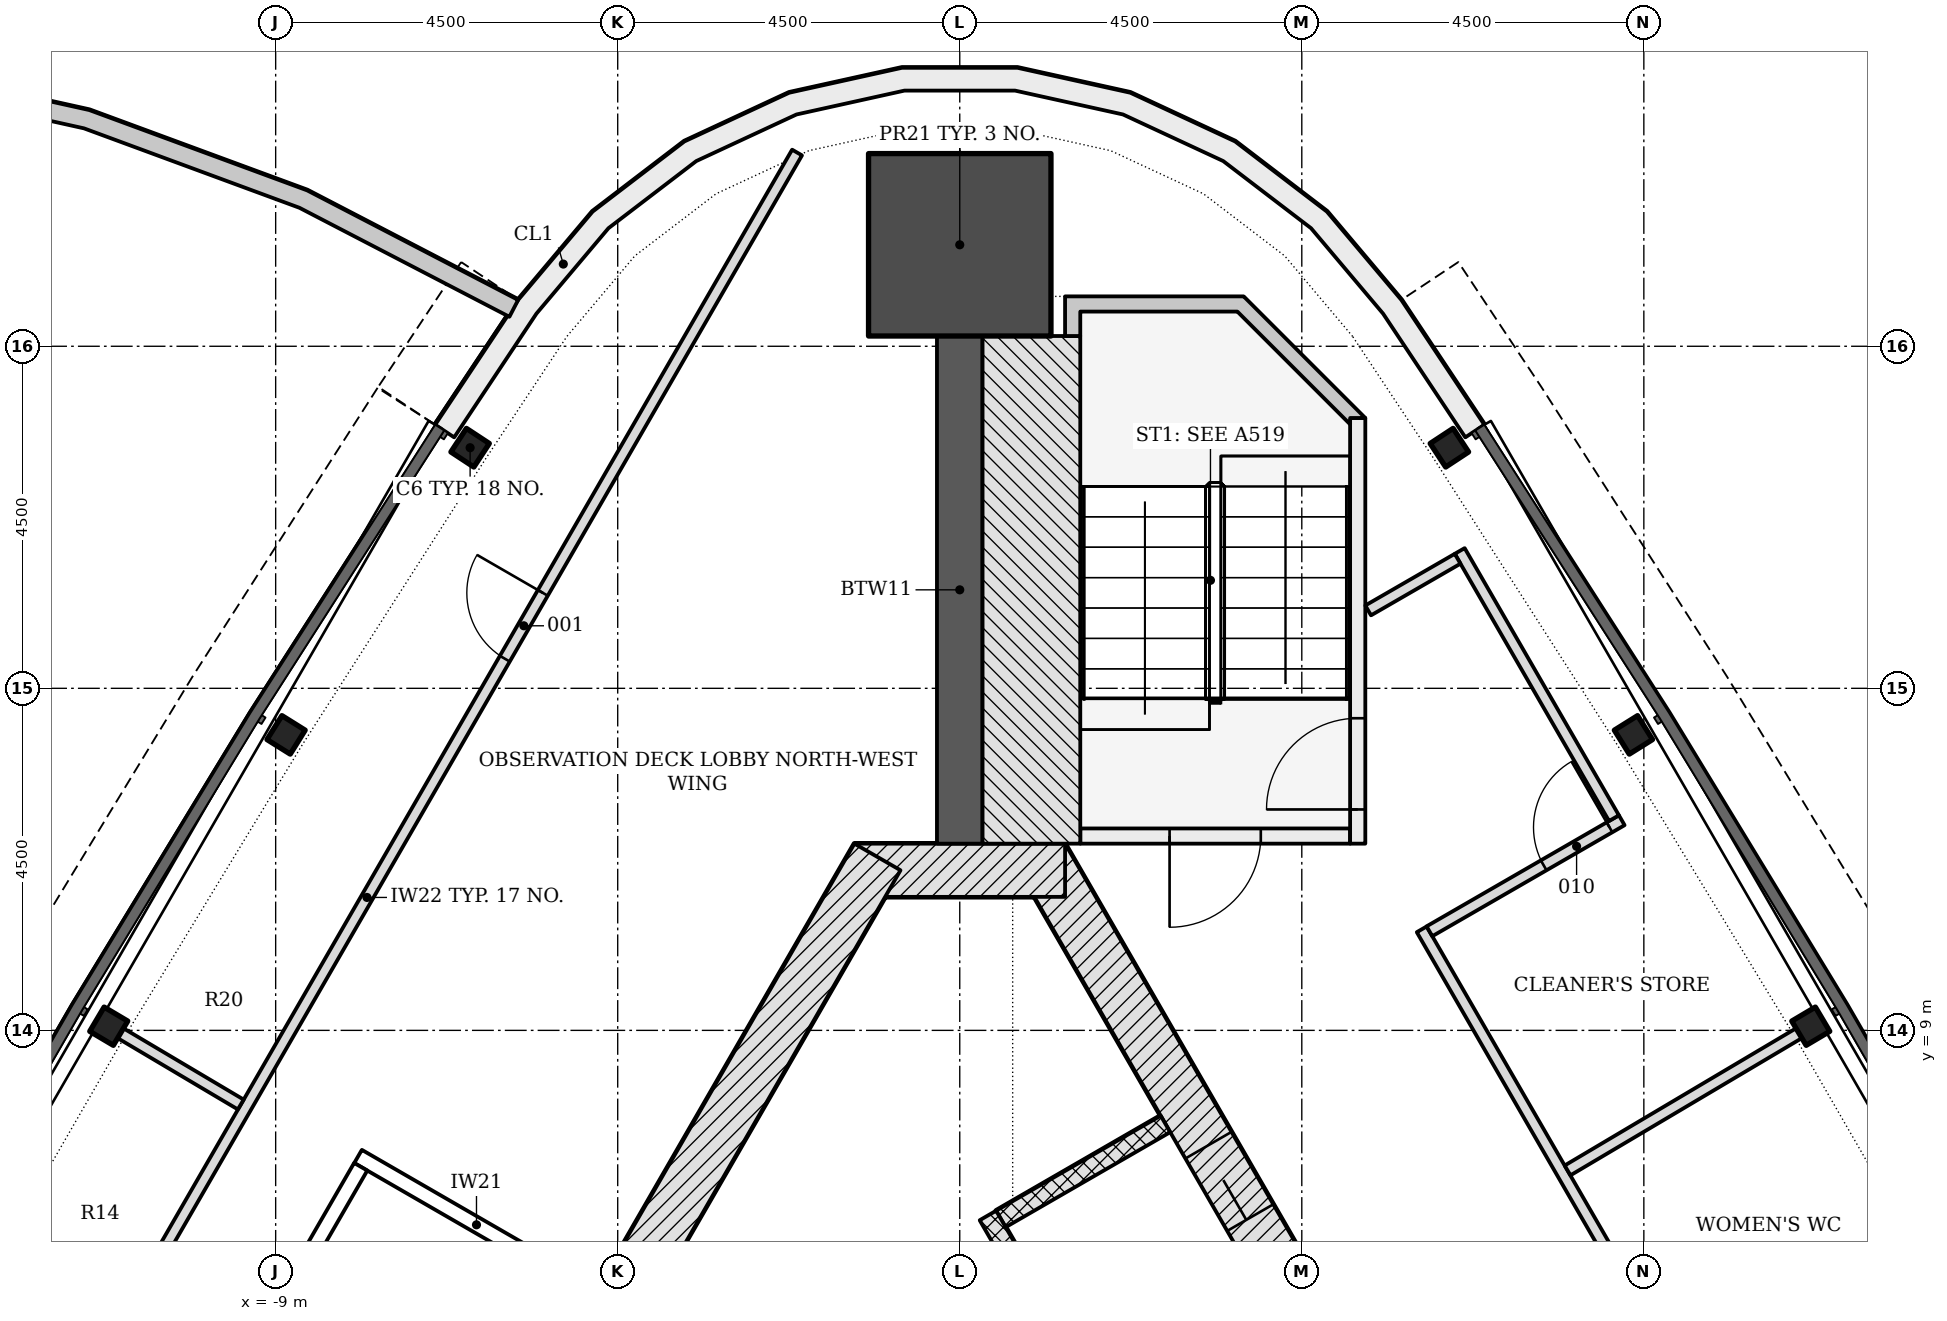
"""IFC4 building model, lengths in metres.
Left out: names, types, materials, properties, quantities, classifications, styles, units other than length and angle.
Written with IfcOpenShell. Run it as: python <this file> out.ifc"""

import sys

from ifc_helpers import new_model, si_unit, direction, frame, frame_2d, origin, origin_2d, place, context, subcontext, project, spatial, polyline, rectangle, i_section, outline, extrude, element, fill, save


model = new_model("IFC4")
c1 = context("Model", 3, precision=1e-05, world=origin(), true_north=direction((0.0, 1.0)))
c2 = subcontext(c1, "Body", "Model", "MODEL_VIEW")
j1 = project(units=[si_unit("LENGTHUNIT", "METRE"), si_unit("PLANEANGLEUNIT", "RADIAN")], contexts=[c1])
p1 = place(None, origin())
s1 = spatial("IfcSite", under=j1, at=p1, CompositionType="ELEMENT")
p2 = place(p1, origin())
s2 = spatial("IfcBuilding", under=s1, at=p2, CompositionType="ELEMENT")
p3 = place(p2, frame((0.0, 0.0, 274.2)))
s3 = spatial("IfcBuildingStorey", under=s2, at=p3, CompositionType="ELEMENT", Elevation=274.2)
p4 = place(p3, frame((10.311, -4.703, -0.2), z_axis=(0.0, 0.0, 1.0), x_axis=(-0.500001446645, 0.866024568562, 0.0)))
e1 = element("IfcWall", 1, at=p4, inside=s3, PredefinedType="SHEAR", context=c2, shape_type="SweptSolid", body=[
    extrude(rectangle(XDim=18.458, YDim=0.7, at=frame_2d((9.229, 0.0))), origin(), (0.0, 0.0, 1.0), 5.35),
])
p5 = place(p4, frame((4.379, 0.0, 0.2)))
e2 = element("IfcOpeningElement", 2, at=p5, cuts=e1, PredefinedType="OPENING", context=c2, shape_type="SweptSolid", body=[
    extrude(rectangle(XDim=1.1, YDim=2.1, at=frame_2d((0.55, 1.05))), frame((0.0, 0.36, 0.0), z_axis=(0.0, -1.0, 0.0), x_axis=(1.0, 0.0, 0.0)), (0.0, 0.0, 1.0), 0.72),
])
p6 = place(p4, frame((6.529, 0.0, 0.2)))
e3 = element("IfcOpeningElement", 3, at=p6, cuts=e1, PredefinedType="OPENING", context=c2, shape_type="SweptSolid", body=[
    extrude(rectangle(XDim=1.1, YDim=2.1, at=frame_2d((0.55, 1.05))), frame((0.0, 0.36, 0.0), z_axis=(0.0, -1.0, 0.0), x_axis=(1.0, 0.0, 0.0)), (0.0, 0.0, 1.0), 0.72),
])
p7 = place(p4, frame((8.679, 0.0, 0.2)))
e4 = element("IfcOpeningElement", 4, at=p7, cuts=e1, PredefinedType="OPENING", context=c2, shape_type="SweptSolid", body=[
    extrude(rectangle(XDim=1.1, YDim=2.1, at=frame_2d((0.55, 1.05))), frame((0.0, 0.36, 0.0), z_axis=(0.0, -1.0, 0.0), x_axis=(1.0, 0.0, 0.0)), (0.0, 0.0, 1.0), 0.72),
])
p8 = place(p4, frame((10.829, 0.0, 0.2)))
e5 = element("IfcOpeningElement", 5, at=p8, cuts=e1, PredefinedType="OPENING", context=c2, shape_type="SweptSolid", body=[
    extrude(rectangle(XDim=1.1, YDim=2.1, at=frame_2d((0.55, 1.05))), frame((0.0, 0.36, 0.0), z_axis=(0.0, -1.0, 0.0), x_axis=(1.0, 0.0, 0.0)), (0.0, 0.0, 1.0), 0.72),
])
p9 = place(p4, frame((12.979, 0.0, 0.2)))
e6 = element("IfcOpeningElement", 6, at=p9, cuts=e1, PredefinedType="OPENING", context=c2, shape_type="SweptSolid", body=[
    extrude(rectangle(XDim=1.1, YDim=2.1, at=frame_2d((0.55, 1.05))), frame((0.0, 0.36, 0.0), z_axis=(0.0, -1.0, 0.0), x_axis=(1.0, 0.0, 0.0)), (0.0, 0.0, 1.0), 0.72),
])
p10 = place(p3, frame((1.386, 11.106, -0.2), z_axis=(0.0, 0.0, 1.0), x_axis=(-1.0, 0.0, 0.0)))
e7 = element("IfcWall", 7, at=p10, inside=s3, PredefinedType="SHEAR", context=c2, shape_type="SweptSolid", body=[
    extrude(rectangle(XDim=2.771, YDim=0.7, at=frame_2d((1.386, 0.0))), origin(), (0.0, 0.0, 1.0), 5.35),
])
p11 = place(p3, frame((-1.083, 11.281, -0.2), z_axis=(0.0, 0.0, 1.0), x_axis=(-0.500001446645, -0.866024568562, 0.0)))
e8 = element("IfcWall", 8, at=p11, inside=s3, PredefinedType="SHEAR", context=c2, shape_type="SweptSolid", body=[
    extrude(rectangle(XDim=18.458, YDim=0.7, at=frame_2d((9.229, 0.0))), origin(), (0.0, 0.0, 1.0), 5.35),
])
p12 = place(p11, frame((8.979, 0.0, 0.2)))
e9 = element("IfcOpeningElement", 9, at=p12, cuts=e8, PredefinedType="OPENING", context=c2, shape_type="SweptSolid", body=[
    extrude(rectangle(XDim=1.2, YDim=2.1, at=frame_2d((0.6, 1.05))), frame((0.0, 0.36, 0.0), z_axis=(0.0, -1.0, 0.0), x_axis=(1.0, 0.0, 0.0)), (0.0, 0.0, 1.0), 0.72),
])
p13 = place(p11, frame((11.029, 0.0, 0.2)))
e10 = element("IfcOpeningElement", 10, at=p13, cuts=e8, PredefinedType="OPENING", context=c2, shape_type="SweptSolid", body=[
    extrude(rectangle(XDim=1.2, YDim=2.1, at=frame_2d((0.6, 1.05))), frame((0.0, 0.36, 0.0), z_axis=(0.0, -1.0, 0.0), x_axis=(1.0, 0.0, 0.0)), (0.0, 0.0, 1.0), 0.72),
])
p14 = place(p11, frame((13.179, 0.0, 0.2)))
e11 = element("IfcOpeningElement", 11, at=p14, cuts=e8, PredefinedType="OPENING", context=c2, shape_type="SweptSolid", body=[
    extrude(rectangle(XDim=1.3, YDim=2.1, at=frame_2d((0.65, 1.05))), frame((0.0, 0.36, 0.0), z_axis=(0.0, -1.0, 0.0), x_axis=(1.0, 0.0, 0.0)), (0.0, 0.0, 1.0), 0.72),
])
p15 = place(p3, frame((0.0, 11.456, -0.2), z_axis=(0.0, 0.0, 1.0), x_axis=(0.0, 1.0, 0.0)))
e12 = element("IfcWall", 12, at=p15, inside=s3, PredefinedType="SHEAR", context=c2, shape_type="SweptSolid", body=[
    extrude(rectangle(XDim=6.679, YDim=0.6, at=frame_2d((3.339, 0.0))), origin(), (0.0, 0.0, 1.0), 5.35),
])
p16 = place(p3, frame((0.0, 19.335, -0.2), z_axis=(0.0, 0.0, 1.0), x_axis=(0.0, 1.0, 0.0)))
e13 = element("IfcColumn", 13, at=p16, inside=s3, PredefinedType="COLUMN", context=c2, shape_type="SweptSolid", body=[
    extrude(rectangle(XDim=2.4, YDim=2.4, at=origin_2d()), origin(), (0.0, 0.0, 1.0), 5.35),
])
for number, where, z_axis, x_axis in (
    (14, (-6.442, 16.666, -0.2), (0.0, 0.0, 1.0), (-0.549, -0.836, 0.0)),
    (15, (-8.863, 12.888, -0.2), (0.0, 0.0, 1.0), (-0.53, -0.848, 0.0)),
    (16, (-11.196, 9.055, -0.2), (0.0, 0.0, 1.0), (-0.51, -0.86, 0.0)),
    (17, (11.196, 9.055, -0.2), (0.0, 0.0, 1.0), (-0.51, 0.86, 0.0)),
    (18, (8.863, 12.888, -0.2), (0.0, 0.0, 1.0), (-0.53, 0.848, 0.0)),
    (19, (6.442, 16.666, -0.2), (0.0, 0.0, 1.0), (-0.549, 0.836, 0.0)),
):
    element("IfcColumn", number, at=place(p3, frame(where, z_axis=z_axis, x_axis=x_axis)), inside=s3, PredefinedType="COLUMN", context=c2, shape_type="SweptSolid", body=[
        extrude(i_section(OverallWidth=0.371, OverallDepth=0.361, WebThickness=0.012, FlangeThickness=0.02, FilletRadius=0.015, at=origin_2d()), origin(), (0.0, 0.0, 1.0), 5.35),
    ])
p17 = place(p3, origin())
e20 = element("IfcWall", 20, at=p17, inside=s3, PredefinedType="NOTDEFINED", context=c2, shape_type="SweptSolid", body=[
    extrude(outline(polyline([(6.901, 16.968), (5.81, 18.61), (4.83, 19.771), (3.623, 20.695), (2.244, 21.335), (0.76, 21.664), (-0.76, 21.664), (-2.244, 21.335), (-3.623, 20.695), (-4.83, 19.771), (-5.81, 18.61), (-6.901, 16.968), (-6.651, 16.802), (-5.569, 18.429), (-4.622, 19.553), (-3.466, 20.437), (-2.147, 21.05), (-0.727, 21.364), (0.727, 21.364), (2.147, 21.05), (3.466, 20.437), (4.622, 19.553), (5.569, 18.429), (6.651, 16.802), (6.901, 16.968)])), origin(), (0.0, 0.0, 1.0), 5.15),
])
p18 = place(p3, origin())
e21 = element("IfcWall", 21, at=p18, inside=s3, PredefinedType="PARAPET", context=c2, shape_type="SweptSolid", body=[
    extrude(outline(polyline([(-5.81, 18.61), (-8.585, 20.051), (-11.451, 21.107), (-14.298, 21.739), (-17.016, 21.922), (-19.5, 21.648), (-21.656, 20.929), (-23.4, 19.792), (-24.665, 18.28), (-25.403, 16.452), (-25.585, 14.378), (-25.205, 12.137), (-24.277, 9.817), (-22.836, 7.505), (-20.938, 5.291), (-18.656, 3.26), (-16.078, 1.49), (-15.937, 1.696), (-18.502, 3.457), (-20.759, 5.467), (-22.634, 7.653), (-24.053, 9.93), (-24.963, 12.205), (-25.333, 14.388), (-25.157, 16.393), (-24.448, 18.15), (-23.232, 19.603), (-21.546, 20.702), (-19.446, 21.403), (-17.01, 21.671), (-14.334, 21.491), (-11.522, 20.867), (-8.687, 19.822), (-5.925, 18.388), (-5.81, 18.61)])), origin(), (0.0, 0.0, 1.0), 1.1),
])
p19 = place(p3, frame((2.706, 7.769, -0.2), z_axis=(0.0, 0.0, 1.0), x_axis=(-0.866022959057, -0.500004234368, 0.0)))
e22 = element("IfcWall", 22, at=p19, inside=s3, PredefinedType="PARTITIONING", context=c2, shape_type="SweptSolid", body=[
    extrude(rectangle(XDim=2.5, YDim=0.25, at=frame_2d((1.25, 0.0))), origin(), (0.0, 0.0, 1.0), 5.35),
])
p20 = place(p3, frame((5.87, -2.961, 0.0), z_axis=(0.0, 0.0, 1.0), x_axis=(-0.50000615651, 0.866021849293, 0.0)))
e23 = element("IfcWall", 23, at=p20, inside=s3, PredefinedType="PARTITIONING", context=c2, shape_type="SweptSolid", body=[
    extrude(rectangle(XDim=11.0, YDim=0.25, at=frame_2d((5.5, 0.0))), origin(), (0.0, 0.0, 1.0), 5.15),
])
p21 = place(p3, frame((5.135, 11.556, -0.2), z_axis=(0.0, 0.0, 1.0), x_axis=(-1.0, 0.0, 0.0)))
e24 = element("IfcWall", 24, at=p21, inside=s3, PredefinedType="SHEAR", context=c2, shape_type="SweptSolid", body=[
    extrude(rectangle(XDim=3.55, YDim=0.2, at=frame_2d((1.775, 0.0))), origin(), (0.0, 0.0, 1.0), 5.35),
])
p22 = place(p21, frame((1.175, 0.0, 0.2)))
e25 = element("IfcOpeningElement", 25, at=p22, cuts=e24, PredefinedType="OPENING", context=c2, shape_type="SweptSolid", body=[
    extrude(rectangle(XDim=1.2, YDim=2.1, at=frame_2d((0.6, 1.05))), frame((0.0, 0.11, 0.0), z_axis=(0.0, -1.0, 0.0), x_axis=(1.0, 0.0, 0.0)), (0.0, 0.0, 1.0), 0.22),
])
p23 = place(p3, frame((5.236, 11.456, -0.2), z_axis=(0.0, 0.0, 1.0), x_axis=(0.0, 1.0, 0.0)))
e26 = element("IfcWall", 26, at=p23, inside=s3, PredefinedType="SHEAR", context=c2, shape_type="SweptSolid", body=[
    extrude(rectangle(XDim=5.6, YDim=0.2, at=frame_2d((2.8, 0.0))), origin(), (0.0, 0.0, 1.0), 5.35),
])
p24 = place(p23, frame((0.45, 0.0, 0.2)))
e27 = element("IfcOpeningElement", 27, at=p24, cuts=e26, PredefinedType="OPENING", context=c2, shape_type="SweptSolid", body=[
    extrude(rectangle(XDim=1.2, YDim=2.1, at=frame_2d((0.6, 1.05))), frame((0.0, 0.11, 0.0), z_axis=(0.0, -1.0, 0.0), x_axis=(1.0, 0.0, 0.0)), (0.0, 0.0, 1.0), 0.22),
])
p25 = place(p3, frame((0.943, 11.456, -0.2), z_axis=(0.0, 0.0, 1.0), x_axis=(0.0, 1.0, 0.0)))
e28 = element("IfcWall", 28, at=p25, inside=s3, PredefinedType="SHEAR", context=c2, shape_type="SweptSolid", body=[
    extrude(rectangle(XDim=6.679, YDim=1.286, at=frame_2d((3.339, 0.0))), origin(), (0.0, 0.0, 1.0), 5.35),
])
p26 = place(p3, frame((0.0, 0.0, -0.2)))
e29 = element("IfcWall", 29, at=p26, inside=s3, PredefinedType="SHEAR", context=c2, shape_type="SweptSolid", body=[
    extrude(outline(polyline([(5.336, 17.056), (3.736, 18.656), (1.385, 18.656), (1.385, 18.135), (1.586, 18.135), (1.586, 18.456), (3.653, 18.456), (5.135, 16.974), (5.135, 17.056), (5.135, 17.056), (5.135, 17.056), (5.135, 17.056), (5.135, 17.056), (5.135, 17.056), (5.135, 17.056), (5.135, 17.056), (5.135, 17.056), (5.135, 17.056), (5.135, 17.056), (5.135, 17.056), (5.135, 17.056), (5.135, 17.056), (5.135, 17.056), (5.135, 17.056), (5.135, 17.056), (5.336, 17.056)])), origin(), (0.0, 0.0, 1.0), 5.35),
])
p27 = place(p3, frame((-4.8, 5.542, 0.0), z_axis=(0.0, 0.0, 1.0), x_axis=(-0.866017220491, 0.500014173611, 0.0)))
e30 = element("IfcWall", 30, at=p27, inside=s3, PredefinedType="PARTITIONING", context=c2, shape_type="SweptSolid", body=[
    extrude(rectangle(XDim=3.598, YDim=0.2, at=frame_2d((1.799, 0.0))), origin(), (0.0, 0.0, 1.0), 5.15),
])
p28 = place(p3, frame((-7.881, 7.206, 0.0), z_axis=(0.0, 0.0, 1.0), x_axis=(-0.499988536525, -0.866032022124, 0.0)))
e31 = element("IfcWall", 31, at=p28, inside=s3, PredefinedType="PARTITIONING", context=c2, shape_type="SweptSolid", body=[
    extrude(rectangle(XDim=5.798, YDim=0.2, at=frame_2d((2.899, 0.0))), origin(), (0.0, 0.0, 1.0), 4.602),
])
p29 = place(p28, frame((3.329, 0.0, 0.0)))
e32 = element("IfcOpeningElement", 32, at=p29, cuts=e31, PredefinedType="OPENING", context=c2, shape_type="SweptSolid", body=[
    extrude(rectangle(XDim=1.2, YDim=2.1, at=frame_2d((0.6, 1.05))), frame((0.0, 0.11, 0.0), z_axis=(0.0, -1.0, 0.0), x_axis=(1.0, 0.0, 0.0)), (0.0, 0.0, 1.0), 0.22),
])
p30 = place(p3, frame((-13.457, 0.949, 0.0), z_axis=(0.0, 0.0, 1.0), x_axis=(0.500001340499, 0.866024629845, 0.0)))
e33 = element("IfcWall", 33, at=p30, inside=s3, PredefinedType="PARTITIONING", context=c2, shape_type="SweptSolid", body=[
    extrude(rectangle(XDim=22.632, YDim=0.15, at=frame_2d((11.316, 0.0))), origin(), (0.0, 0.0, 1.0), 4.602),
])
p31 = place(p30, frame((14.943, 0.0, 0.0)))
e34 = element("IfcOpeningElement", 34, at=p31, cuts=e33, PredefinedType="OPENING", context=c2, shape_type="SweptSolid", body=[
    extrude(rectangle(XDim=1.0, YDim=2.1, at=frame_2d((0.5, 1.05))), frame((0.0, 0.085, 0.0), z_axis=(0.0, -1.0, 0.0), x_axis=(1.0, 0.0, 0.0)), (0.0, 0.0, 1.0), 0.17),
])
p32 = place(p30, frame((0.329, 0.0, 0.0)))
e35 = element("IfcOpeningElement", 35, at=p32, cuts=e33, PredefinedType="OPENING", context=c2, shape_type="SweptSolid", body=[
    extrude(rectangle(XDim=1.0, YDim=2.1, at=frame_2d((0.5, 1.05))), frame((0.0, 0.085, 0.0), z_axis=(0.0, -1.0, 0.0), x_axis=(1.0, 0.0, 0.0)), (0.0, 0.0, 1.0), 0.17),
])
p33 = place(p3, frame((-11.046, 8.966, 0.0), z_axis=(0.0, 0.0, 1.0), x_axis=(0.860132404911, -0.510070824516, 0.0)))
e36 = element("IfcWall", 36, at=p33, inside=s3, PredefinedType="PARTITIONING", context=c2, shape_type="SweptSolid", body=[
    extrude(rectangle(XDim=1.845, YDim=0.15, at=frame_2d((0.922, 0.0))), origin(), (0.0, 0.0, 1.0), 4.602),
])
p34 = place(p3, frame((6.078, 10.329, 0.0), z_axis=(0.0, 0.0, 1.0), x_axis=(0.499992222505, -0.866029894076, 0.0)))
e37 = element("IfcWall", 37, at=p34, inside=s3, PredefinedType="PARTITIONING", context=c2, shape_type="SweptSolid", body=[
    extrude(rectangle(XDim=21.439, YDim=0.15, at=frame_2d((10.719, 0.0))), origin(), (0.0, 0.0, 1.0), 4.602),
])
p35 = place(p34, frame((14.337, 0.0, 0.0)))
e38 = element("IfcOpeningElement", 38, at=p35, cuts=e37, PredefinedType="OPENING", context=c2, shape_type="SweptSolid", body=[
    extrude(rectangle(XDim=1.0, YDim=2.1, at=frame_2d((0.5, 1.05))), frame((0.0, 0.085, 0.0), z_axis=(0.0, -1.0, 0.0), x_axis=(1.0, 0.0, 0.0)), (0.0, 0.0, 1.0), 0.17),
])
p36 = place(p34, frame((5.51, 0.0, 0.0)))
e39 = element("IfcOpeningElement", 39, at=p36, cuts=e37, PredefinedType="OPENING", context=c2, shape_type="SweptSolid", body=[
    extrude(rectangle(XDim=1.0, YDim=2.1, at=frame_2d((0.5, 1.05))), frame((0.0, 0.085, 0.0), z_axis=(0.0, -1.0, 0.0), x_axis=(1.0, 0.0, 0.0)), (0.0, 0.0, 1.0), 0.17),
])
p37 = place(p3, frame((7.997, 7.158, 0.0), z_axis=(0.0, 0.0, 1.0), x_axis=(0.860167325151, 0.510011933921, 0.0)))
e40 = element("IfcWall", 40, at=p37, inside=s3, PredefinedType="PARTITIONING", context=c2, shape_type="SweptSolid", body=[
    extrude(rectangle(XDim=3.545, YDim=0.15, at=frame_2d((1.772, 0.0))), origin(), (0.0, 0.0, 1.0), 4.602),
])
p38 = place(p3, frame((6.179, 10.304, 0.0), z_axis=(0.0, 0.0, 1.0), x_axis=(0.866049218703, 0.499958749083, 0.0)))
e41 = element("IfcWall", 41, at=p38, inside=s3, PredefinedType="PARTITIONING", context=c2, shape_type="SweptSolid", body=[
    extrude(rectangle(XDim=2.922, YDim=0.15, at=frame_2d((1.461, 0.0))), origin(), (0.0, 0.0, 1.0), 5.15),
])
p39 = place(p38, frame((1.736, 0.0, 0.0)))
e42 = element("IfcOpeningElement", 42, at=p39, cuts=e41, PredefinedType="OPENING", context=c2, shape_type="SweptSolid", body=[
    extrude(rectangle(XDim=1.0, YDim=2.1, at=frame_2d((0.5, 1.05))), frame((0.0, 0.085, 0.0), z_axis=(0.0, -1.0, 0.0), x_axis=(1.0, 0.0, 0.0)), (0.0, 0.0, 1.0), 0.17),
])
p40 = place(p3, frame((8.607, 11.792, 0.0), z_axis=(0.0, 0.0, 1.0), x_axis=(-0.499994954979, 0.866028316509, 0.0)))
e43 = element("IfcWall", 43, at=p40, inside=s3, PredefinedType="PARTITIONING", context=c2, shape_type="SweptSolid", body=[
    extrude(rectangle(XDim=4.059, YDim=0.15, at=frame_2d((2.029, 0.0))), origin(), (0.0, 0.0, 1.0), 4.602),
])
p41 = place(p3, frame((6.55, 15.205, 0.0), z_axis=(0.0, 0.0, 1.0), x_axis=(-0.865979171045, -0.500080068905, 0.0)))
e44 = element("IfcWall", 44, at=p41, inside=s3, PredefinedType="PARTITIONING", context=c2, shape_type="SweptSolid", body=[
    extrude(rectangle(XDim=1.359, YDim=0.15, at=frame_2d((0.68, 0.0))), origin(), (0.0, 0.0, 1.0), 5.15),
])
p42 = place(p9, origin())
e45 = element("IfcDoor", 45, at=p42, inside=s3, OperationType="DOUBLE_DOOR_SLIDING", PredefinedType="DOOR", context=c2, shape_type="SweptSolid", body=[
    extrude(rectangle(XDim=1.1, YDim=2.1, at=frame_2d((0.55, 1.05))), frame((0.0, 0.025, 0.0), z_axis=(0.0, -1.0, 0.0), x_axis=(1.0, 0.0, 0.0)), (0.0, 0.0, 1.0), 0.05),
])
fill(e6, e45)
p43 = place(p22, origin())
e46 = element("IfcDoor", 46, at=p43, inside=s3, OperationType="SINGLE_SWING_RIGHT", PredefinedType="DOOR", context=c2, shape_type="SweptSolid", body=[
    extrude(rectangle(XDim=1.2, YDim=2.1, at=frame_2d((0.6, 1.05))), frame((0.0, 0.025, 0.0), z_axis=(0.0, -1.0, 0.0), x_axis=(1.0, 0.0, 0.0)), (0.0, 0.0, 1.0), 0.05),
])
fill(e25, e46)
p44 = place(p24, origin())
e47 = element("IfcDoor", 47, at=p44, inside=s3, OperationType="SINGLE_SWING_LEFT", PredefinedType="DOOR", context=c2, shape_type="SweptSolid", body=[
    extrude(rectangle(XDim=1.2, YDim=2.1, at=frame_2d((0.6, 1.05))), frame((0.0, 0.025, 0.0), z_axis=(0.0, -1.0, 0.0), x_axis=(1.0, 0.0, 0.0)), (0.0, 0.0, 1.0), 0.05),
])
fill(e27, e47)
p45 = place(p31, origin())
e48 = element("IfcDoor", 48, at=p45, inside=s3, OperationType="SINGLE_SWING_RIGHT", PredefinedType="DOOR", context=c2, shape_type="SweptSolid", body=[
    extrude(rectangle(XDim=1.0, YDim=2.1, at=frame_2d((0.5, 1.05))), frame((0.0, 0.025, 0.0), z_axis=(0.0, -1.0, 0.0), x_axis=(1.0, 0.0, 0.0)), (0.0, 0.0, 1.0), 0.05),
])
fill(e34, e48)
p46 = place(p39, origin())
e49 = element("IfcDoor", 49, at=p46, inside=s3, OperationType="SINGLE_SWING_RIGHT", PredefinedType="DOOR", context=c2, shape_type="SweptSolid", body=[
    extrude(rectangle(XDim=1.0, YDim=2.1, at=frame_2d((0.5, 1.05))), frame((0.0, 0.025, 0.0), z_axis=(0.0, -1.0, 0.0), x_axis=(1.0, 0.0, 0.0)), (0.0, 0.0, 1.0), 0.05),
])
fill(e42, e49)
save(model, sys.argv[1])
